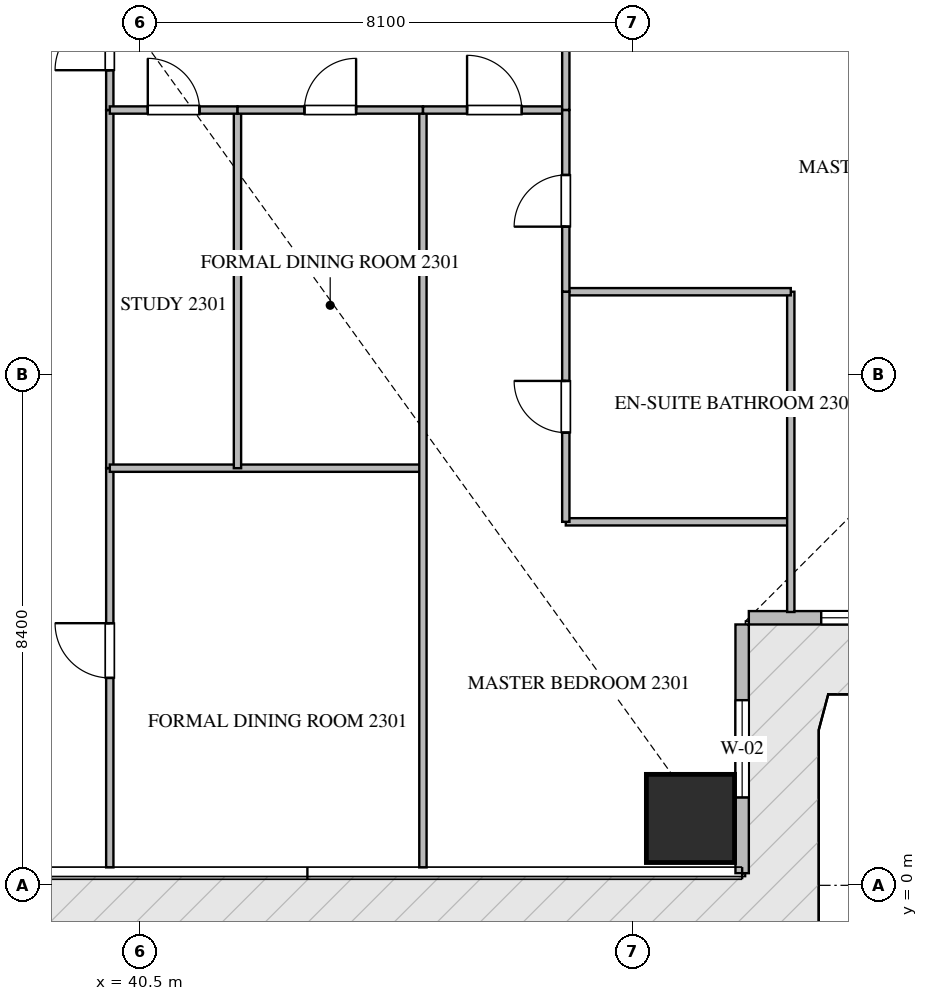
"""IFC4 building model, lengths in metres.
Left out: names, types, materials, properties, quantities, classifications, styles, units other than length and angle.
Written with IfcOpenShell. Run it as: python <this file> out.ifc"""

import sys

from ifc_helpers import new_model, si_unit, direction, frame, frame_2d, origin, origin_2d, place, context, subcontext, project, spatial, rectangle, extrude, source, transform, mapped, element, fill, save


model = new_model("IFC4")
c1 = context("Model", 3, precision=1e-05, world=origin(), true_north=direction((0.0, 1.0)))
c2 = subcontext(c1, "Body", "Model", "MODEL_VIEW")
j1 = project(units=[si_unit("LENGTHUNIT", "METRE"), si_unit("PLANEANGLEUNIT", "RADIAN")], contexts=[c1])
p1 = place(None, origin())
s1 = spatial("IfcSite", under=j1, at=p1, CompositionType="ELEMENT")
p2 = place(p1, origin())
s2 = spatial("IfcBuilding", under=s1, at=p2, CompositionType="ELEMENT")
p3 = place(p2, frame((0.0, 0.0, 94.2)))
s3 = spatial("IfcBuildingStorey", under=s2, at=p3, CompositionType="ELEMENT", Elevation=94.2)
m1 = source(origin(), c2, "Body", "SweptSolid", [
    extrude(rectangle(XDim=1.45, YDim=1.45, at=origin_2d()), origin(), (0.0, 0.0, 1.0), 3.75),
])
p4 = place(p3, frame((49.55, 1.1, -0.26), z_axis=(0.0, 0.0, 1.0), x_axis=(1.0, 0.0, 0.0)))
e1 = element("IfcColumn", 1, at=p4, inside=s3, PredefinedType="COLUMN", context=c2, shape_type="MappedRepresentation", body=[
    mapped(m1, transform((0.0, 0.0, 0.0), scale=1.0)),
])
p5 = place(p3, frame((50.4, 0.2, 0.0), z_axis=(0.0, 0.0, 1.0), x_axis=(0.0, 1.0, 0.0)))
e2 = element("IfcWall", 2, at=p5, inside=s3, PredefinedType="ELEMENTEDWALL", context=c2, shape_type="SweptSolid", body=[
    extrude(rectangle(XDim=4.09, YDim=0.22, at=frame_2d((2.045, 0.0))), origin(), (0.0, 0.0, 1.0), 3.475),
])
p6 = place(p5, frame((1.245, 0.0, 0.65)))
e3 = element("IfcOpeningElement", 3, at=p6, cuts=e2, PredefinedType="OPENING", context=c2, shape_type="SweptSolid", body=[
    extrude(rectangle(XDim=1.6, YDim=2.1, at=frame_2d((0.8, 1.05))), frame((0.0, 0.12, 0.0), z_axis=(0.0, -1.0, 0.0), x_axis=(1.0, 0.0, 0.0)), (0.0, 0.0, 1.0), 0.24),
])
p7 = place(p3, frame((50.51, 4.4, 0.0), z_axis=(0.0, 0.0, 1.0), x_axis=(1.0, 0.0, 0.0)))
e4 = element("IfcWall", 4, at=p7, inside=s3, PredefinedType="ELEMENTEDWALL", context=c2, shape_type="SweptSolid", body=[
    extrude(rectangle(XDim=3.98, YDim=0.22, at=frame_2d((1.99, 0.0))), origin(), (0.0, 0.0, 1.0), 3.475),
])
p8 = place(p7, frame((1.19, 0.0, 0.65)))
e5 = element("IfcOpeningElement", 5, at=p8, cuts=e4, PredefinedType="OPENING", context=c2, shape_type="SweptSolid", body=[
    extrude(rectangle(XDim=1.6, YDim=2.1, at=frame_2d((0.8, 1.05))), frame((0.0, 0.12, 0.0), z_axis=(0.0, -1.0, 0.0), x_axis=(1.0, 0.0, 0.0)), (0.0, 0.0, 1.0), 0.24),
])
p9 = place(p3, frame((40.0, 12.75, 0.0), z_axis=(0.0, 0.0, 1.0), x_axis=(0.0, 1.0, 0.0)))
e6 = element("IfcWall", 6, at=p9, inside=s3, PredefinedType="PARTITIONING", context=c2, shape_type="SweptSolid", body=[
    extrude(rectangle(XDim=2.21, YDim=0.12, at=frame_2d((1.105, 0.0))), origin(), (0.0, 0.0, 1.0), 3.49),
])
p10 = place(p9, frame((0.655, 0.0, 0.0)))
e7 = element("IfcOpeningElement", 7, at=p10, cuts=e6, PredefinedType="OPENING", context=c2, shape_type="SweptSolid", body=[
    extrude(rectangle(XDim=0.9, YDim=2.1, at=frame_2d((0.45, 1.05))), frame((0.0, 0.07, 0.0), z_axis=(0.0, -1.0, 0.0), x_axis=(1.0, 0.0, 0.0)), (0.0, 0.0, 1.0), 0.14),
])
p11 = place(p3, frame((40.0, 0.295, 0.0), z_axis=(0.0, 0.0, 1.0), x_axis=(0.0, 1.0, 0.0)))
e8 = element("IfcWall", 8, at=p11, inside=s3, PredefinedType="PARTITIONING", context=c2, shape_type="SweptSolid", body=[
    extrude(rectangle(XDim=6.565, YDim=0.12, at=frame_2d((3.283, 0.0))), origin(), (0.0, 0.0, 1.0), 3.49),
])
p12 = place(p11, frame((3.116, 0.0, 0.0)))
e9 = element("IfcOpeningElement", 9, at=p12, cuts=e8, PredefinedType="OPENING", context=c2, shape_type="SweptSolid", body=[
    extrude(rectangle(XDim=0.9, YDim=2.1, at=frame_2d((0.45, 1.05))), frame((0.0, 0.07, 0.0), z_axis=(0.0, -1.0, 0.0), x_axis=(1.0, 0.0, 0.0)), (0.0, 0.0, 1.0), 0.14),
])
p13 = place(p3, frame((40.0, 6.862, 0.0), z_axis=(0.0, 0.0, 1.0), x_axis=(0.0, 1.0, 0.0)))
e10 = element("IfcWall", 10, at=p13, inside=s3, PredefinedType="PARTITIONING", context=c2, shape_type="SweptSolid", body=[
    extrude(rectangle(XDim=5.886, YDim=0.12, at=frame_2d((2.943, 0.0))), origin(), (0.0, 0.0, 1.0), 3.49),
])
p14 = place(p3, frame((40.0, 6.86, 0.0), z_axis=(0.0, 0.0, 1.0), x_axis=(1.0, 0.0, 0.0)))
e11 = element("IfcWall", 11, at=p14, inside=s3, PredefinedType="PARTITIONING", context=c2, shape_type="SweptSolid", body=[
    extrude(rectangle(XDim=5.15, YDim=0.12, at=frame_2d((2.575, 0.0))), origin(), (0.0, 0.0, 1.0), 3.49),
])
p15 = place(p3, frame((45.15, 0.295, 0.0), z_axis=(0.0, 0.0, 1.0), x_axis=(0.0, 1.0, 0.0)))
e12 = element("IfcWall", 12, at=p15, inside=s3, PredefinedType="PARTITIONING", context=c2, shape_type="SweptSolid", body=[
    extrude(rectangle(XDim=12.455, YDim=0.12, at=frame_2d((6.228, 0.0))), origin(), (0.0, 0.0, 1.0), 3.49),
])
p16 = place(p3, frame((42.1, 6.86, 0.0), z_axis=(0.0, 0.0, 1.0), x_axis=(0.0, 1.0, 0.0)))
e13 = element("IfcWall", 13, at=p16, inside=s3, PredefinedType="PARTITIONING", context=c2, shape_type="SweptSolid", body=[
    extrude(rectangle(XDim=5.89, YDim=0.12, at=frame_2d((2.945, 0.0))), origin(), (0.0, 0.0, 1.0), 3.49),
])
p17 = place(p3, frame((40.0, 12.75, 0.0), z_axis=(0.0, 0.0, 1.0), x_axis=(1.0, 0.0, 0.0)))
e14 = element("IfcWall", 14, at=p17, inside=s3, PredefinedType="PARTITIONING", context=c2, shape_type="SweptSolid", body=[
    extrude(rectangle(XDim=2.1, YDim=0.12, at=frame_2d((1.05, 0.0))), origin(), (0.0, 0.0, 1.0), 3.49),
])
p18 = place(p17, frame((0.625, 0.0, 0.0)))
e15 = element("IfcOpeningElement", 15, at=p18, cuts=e14, PredefinedType="OPENING", context=c2, shape_type="SweptSolid", body=[
    extrude(rectangle(XDim=0.85, YDim=2.1, at=frame_2d((0.425, 1.05))), frame((0.0, 0.07, 0.0), z_axis=(0.0, -1.0, 0.0), x_axis=(1.0, 0.0, 0.0)), (0.0, 0.0, 1.0), 0.14),
])
p19 = place(p3, frame((42.102, 12.75, 0.0), z_axis=(0.0, 0.0, 1.0), x_axis=(1.0, 0.0, 0.0)))
e16 = element("IfcWall", 16, at=p19, inside=s3, PredefinedType="PARTITIONING", context=c2, shape_type="SweptSolid", body=[
    extrude(rectangle(XDim=3.048, YDim=0.12, at=frame_2d((1.524, 0.0))), origin(), (0.0, 0.0, 1.0), 3.49),
])
p20 = place(p19, frame((1.099, 0.0, 0.0)))
e17 = element("IfcOpeningElement", 17, at=p20, cuts=e16, PredefinedType="OPENING", context=c2, shape_type="SweptSolid", body=[
    extrude(rectangle(XDim=0.85, YDim=2.1, at=frame_2d((0.425, 1.05))), frame((0.0, 0.07, 0.0), z_axis=(0.0, -1.0, 0.0), x_axis=(1.0, 0.0, 0.0)), (0.0, 0.0, 1.0), 0.14),
])
p21 = place(p3, frame((45.152, 12.75, 0.0), z_axis=(0.0, 0.0, 1.0), x_axis=(1.0, 0.0, 0.0)))
e18 = element("IfcWall", 18, at=p21, inside=s3, PredefinedType="PARTITIONING", context=c2, shape_type="SweptSolid", body=[
    extrude(rectangle(XDim=2.348, YDim=0.12, at=frame_2d((1.174, 0.0))), origin(), (0.0, 0.0, 1.0), 3.49),
])
p22 = place(p21, frame((0.724, 0.0, 0.0)))
e19 = element("IfcOpeningElement", 19, at=p22, cuts=e18, PredefinedType="OPENING", context=c2, shape_type="SweptSolid", body=[
    extrude(rectangle(XDim=0.9, YDim=2.1, at=frame_2d((0.45, 1.05))), frame((0.0, 0.07, 0.0), z_axis=(0.0, -1.0, 0.0), x_axis=(1.0, 0.0, 0.0)), (0.0, 0.0, 1.0), 0.14),
])
p23 = place(p3, frame((47.5, 5.978, 0.0), z_axis=(0.0, 0.0, 1.0), x_axis=(1.0, 0.0, 0.0)))
e20 = element("IfcWall", 20, at=p23, inside=s3, PredefinedType="PARTITIONING", context=c2, shape_type="SweptSolid", body=[
    extrude(rectangle(XDim=3.7, YDim=0.12, at=frame_2d((1.85, 0.0))), origin(), (0.0, 0.0, 1.0), 3.49),
])
p24 = place(p3, frame((51.2, 4.495, 0.0), z_axis=(0.0, 0.0, 1.0), x_axis=(0.0, 1.0, 0.0)))
e21 = element("IfcWall", 21, at=p24, inside=s3, PredefinedType="PARTITIONING", context=c2, shape_type="SweptSolid", body=[
    extrude(rectangle(XDim=5.267, YDim=0.12, at=frame_2d((2.633, 0.0))), origin(), (0.0, 0.0, 1.0), 3.49),
])
p25 = place(p3, frame((47.5, 9.762, 0.0), z_axis=(0.0, 0.0, 1.0), x_axis=(1.0, 0.0, 0.0)))
e22 = element("IfcWall", 22, at=p25, inside=s3, PredefinedType="PARTITIONING", context=c2, shape_type="SweptSolid", body=[
    extrude(rectangle(XDim=3.7, YDim=0.12, at=frame_2d((1.85, 0.0))), origin(), (0.0, 0.0, 1.0), 3.49),
])
p26 = place(p3, frame((47.5, 5.978, 0.0), z_axis=(0.0, 0.0, 1.0), x_axis=(0.0, 1.0, 0.0)))
e23 = element("IfcWall", 23, at=p26, inside=s3, PredefinedType="PARTITIONING", context=c2, shape_type="SweptSolid", body=[
    extrude(rectangle(XDim=3.784, YDim=0.12, at=frame_2d((1.892, 0.0))), origin(), (0.0, 0.0, 1.0), 3.49),
])
p27 = place(p26, frame((1.467, 0.0, 0.0)))
e24 = element("IfcOpeningElement", 24, at=p27, cuts=e23, PredefinedType="OPENING", context=c2, shape_type="SweptSolid", body=[
    extrude(rectangle(XDim=0.85, YDim=2.1, at=frame_2d((0.425, 1.05))), frame((0.0, 0.07, 0.0), z_axis=(0.0, -1.0, 0.0), x_axis=(1.0, 0.0, 0.0)), (0.0, 0.0, 1.0), 0.14),
])
p28 = place(p3, frame((47.5, 9.764, 0.0), z_axis=(0.0, 0.0, 1.0), x_axis=(0.0, 1.0, 0.0)))
e25 = element("IfcWall", 25, at=p28, inside=s3, PredefinedType="PARTITIONING", context=c2, shape_type="SweptSolid", body=[
    extrude(rectangle(XDim=2.986, YDim=0.12, at=frame_2d((1.493, 0.0))), origin(), (0.0, 0.0, 1.0), 3.49),
])
p29 = place(p28, frame((1.068, 0.0, 0.0)))
e26 = element("IfcOpeningElement", 26, at=p29, cuts=e25, PredefinedType="OPENING", context=c2, shape_type="SweptSolid", body=[
    extrude(rectangle(XDim=0.85, YDim=2.1, at=frame_2d((0.425, 1.05))), frame((0.0, 0.07, 0.0), z_axis=(0.0, -1.0, 0.0), x_axis=(1.0, 0.0, 0.0)), (0.0, 0.0, 1.0), 0.14),
])
p30 = place(p3, frame((47.5, 12.752, 0.0), z_axis=(0.0, 0.0, 1.0), x_axis=(0.0, 1.0, 0.0)))
e27 = element("IfcWall", 27, at=p30, inside=s3, PredefinedType="PARTITIONING", context=c2, shape_type="SweptSolid", body=[
    extrude(rectangle(XDim=2.208, YDim=0.12, at=frame_2d((1.104, 0.0))), origin(), (0.0, 0.0, 1.0), 3.49),
])
m2 = source(origin(), c2, "Body", "SweptSolid", [
    extrude(rectangle(XDim=1.6, YDim=2.1, at=frame_2d((0.8, 1.05))), frame((0.0, 0.03, 0.0), z_axis=(0.0, -1.0, 0.0), x_axis=(1.0, 0.0, 0.0)), (0.0, 0.0, 1.0), 0.06),
])
p31 = place(p6, origin())
e28 = element("IfcWindow", 28, at=p31, inside=s3, PartitioningType="SINGLE_PANEL", PredefinedType="WINDOW", context=c2, shape_type="MappedRepresentation", body=[
    mapped(m2, transform((0.0, 0.0, 0.0), scale=1.0)),
])
fill(e3, e28)
p32 = place(p8, origin())
e29 = element("IfcWindow", 29, at=p32, inside=s3, PartitioningType="SINGLE_PANEL", PredefinedType="WINDOW", context=c2, shape_type="MappedRepresentation", body=[
    mapped(m2, transform((0.0, 0.0, 0.0), scale=1.0)),
])
fill(e5, e29)
m3 = source(origin(), c2, "Body", "SweptSolid", [
    extrude(rectangle(XDim=0.9, YDim=2.1, at=frame_2d((0.45, 1.05))), frame((0.0, 0.025, 0.0), z_axis=(0.0, -1.0, 0.0), x_axis=(1.0, 0.0, 0.0)), (0.0, 0.0, 1.0), 0.05),
])
p33 = place(p10, origin())
e30 = element("IfcDoor", 30, at=p33, inside=s3, OperationType="SINGLE_SWING_LEFT", PredefinedType="DOOR", context=c2, shape_type="MappedRepresentation", body=[
    mapped(m3, transform((0.0, 0.0, 0.0), scale=1.0)),
])
fill(e7, e30)
p34 = place(p12, origin())
e31 = element("IfcDoor", 31, at=p34, inside=s3, OperationType="SINGLE_SWING_RIGHT", PredefinedType="DOOR", context=c2, shape_type="MappedRepresentation", body=[
    mapped(m3, transform((0.0, 0.0, 0.0), scale=1.0)),
])
fill(e9, e31)
m4 = source(origin(), c2, "Body", "SweptSolid", [
    extrude(rectangle(XDim=0.85, YDim=2.1, at=frame_2d((0.425, 1.05))), frame((0.0, 0.025, 0.0), z_axis=(0.0, -1.0, 0.0), x_axis=(1.0, 0.0, 0.0)), (0.0, 0.0, 1.0), 0.05),
])
p35 = place(p18, origin())
e32 = element("IfcDoor", 32, at=p35, inside=s3, OperationType="SINGLE_SWING_LEFT", PredefinedType="DOOR", context=c2, shape_type="MappedRepresentation", body=[
    mapped(m4, transform((0.0, 0.0, 0.0), scale=1.0)),
])
fill(e15, e32)
p36 = place(p20, origin())
e33 = element("IfcDoor", 33, at=p36, inside=s3, OperationType="SINGLE_SWING_RIGHT", PredefinedType="DOOR", context=c2, shape_type="MappedRepresentation", body=[
    mapped(m4, transform((0.0, 0.0, 0.0), scale=1.0)),
])
fill(e17, e33)
p37 = place(p22, origin())
e34 = element("IfcDoor", 34, at=p37, inside=s3, OperationType="SINGLE_SWING_LEFT", PredefinedType="DOOR", context=c2, shape_type="MappedRepresentation", body=[
    mapped(m3, transform((0.0, 0.0, 0.0), scale=1.0)),
])
fill(e19, e34)
p38 = place(p27, origin())
e35 = element("IfcDoor", 35, at=p38, inside=s3, OperationType="SINGLE_SWING_RIGHT", PredefinedType="DOOR", context=c2, shape_type="MappedRepresentation", body=[
    mapped(m4, transform((0.0, 0.0, 0.0), scale=1.0)),
])
fill(e24, e35)
p39 = place(p29, origin())
e36 = element("IfcDoor", 36, at=p39, inside=s3, OperationType="SINGLE_SWING_LEFT", PredefinedType="DOOR", context=c2, shape_type="MappedRepresentation", body=[
    mapped(m4, transform((0.0, 0.0, 0.0), scale=1.0)),
])
fill(e26, e36)
save(model, sys.argv[1])
